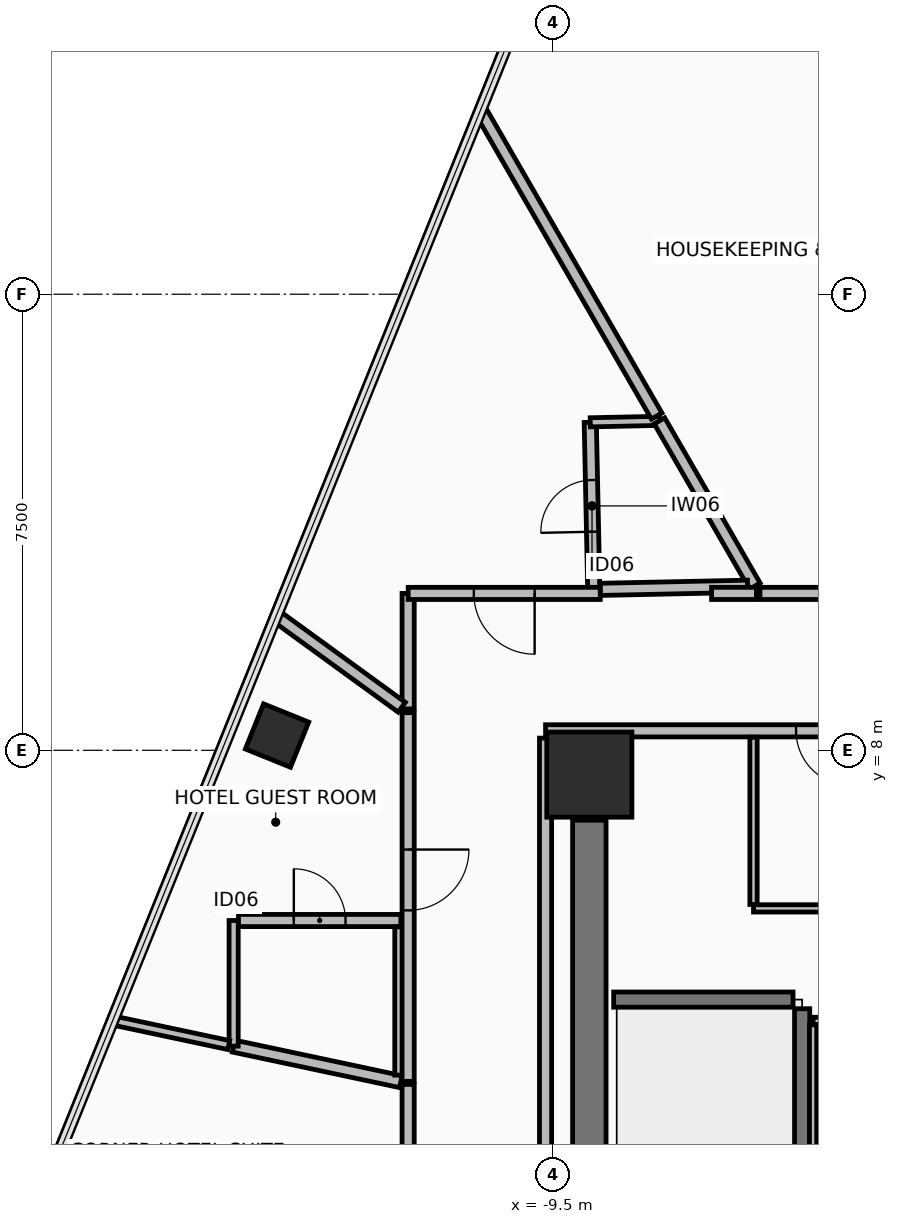
"""IFC4 building model, lengths in metres.
Left out: names, types, materials, properties, quantities, classifications, styles, units other than length and angle.
Written with IfcOpenShell. Run it as: python <this file> out.ifc"""

import sys

from ifc_helpers import new_model, si_unit, direction, frame, frame_2d, origin, origin_2d, place, context, subcontext, project, spatial, rectangle, hollow_rectangle, extrude, element, fill, save


model = new_model("IFC4")
c1 = context("Model", 3, precision=1e-05, world=origin(), true_north=direction((0.0, 1.0)))
c2 = subcontext(c1, "Body", "Model", "MODEL_VIEW")
j1 = project(units=[si_unit("LENGTHUNIT", "METRE"), si_unit("PLANEANGLEUNIT", "RADIAN")], contexts=[c1])
p1 = place(None, origin())
s1 = spatial("IfcSite", under=j1, at=p1, CompositionType="ELEMENT")
p2 = place(p1, origin())
s2 = spatial("IfcBuilding", under=s1, at=p2, CompositionType="ELEMENT")
p3 = place(p2, frame((0.0, 0.0, 63.85)))
s3 = spatial("IfcBuildingStorey", under=s2, at=p3, CompositionType="ELEMENT", Elevation=63.85)
p4 = place(p3, frame((-8.9, 7.6, 0.0), z_axis=(0.0, 0.0, 1.0), x_axis=(1.0, 0.0, 0.0)))
e1 = element("IfcColumn", 1, at=p4, inside=s3, PredefinedType="COLUMN", context=c2, shape_type="SweptSolid", body=[
    extrude(rectangle(XDim=1.4, YDim=1.4, at=origin_2d()), origin(), (0.0, 0.0, 1.0), 3.45),
])
p5 = place(p3, frame((-14.036, 8.242, 0.0), z_axis=(0.0, 0.0, 1.0), x_axis=(0.374608211656, 0.927183200754, 0.0)))
e2 = element("IfcColumn", 2, at=p5, inside=s3, PredefinedType="COLUMN", context=c2, shape_type="SweptSolid", body=[
    extrude(hollow_rectangle(XDim=0.8, YDim=0.8, WallThickness=0.045, at=origin_2d()), origin(), (0.0, 0.0, 1.0), 3.45),
])
p6 = place(p3, frame((-3.383, 19.273, 0.0), z_axis=(0.0, 0.0, 1.0), x_axis=(-0.615654149001, 0.788016477504, 0.0)))
e3 = element("IfcWall", 3, at=p6, inside=s3, PredefinedType="STANDARD", context=c2, shape_type="SweptSolid", body=[
    extrude(rectangle(XDim=7.5, YDim=0.3, at=frame_2d((3.75, 0.0))), origin(), (0.0, 0.0, 1.0), 2.47),
])
p7 = place(p6, frame((2.768, 0.0, 0.0)))
e4 = element("IfcOpeningElement", 4, at=p7, cuts=e3, PredefinedType="OPENING", context=c2, shape_type="SweptSolid", body=[
    extrude(rectangle(XDim=1.1, YDim=2.2, at=frame_2d((0.55, 1.1))), frame((0.0, 0.16, 0.0), z_axis=(0.0, -1.0, 0.0), x_axis=(1.0, 0.0, 0.0)), (0.0, 0.0, 1.0), 0.32),
])
p8 = place(p3, frame((-8.9, -3.85, 0.0), z_axis=(0.0, 0.0, 1.0), x_axis=(0.0, 1.0, 0.0)))
e5 = element("IfcWall", 5, at=p8, inside=s3, PredefinedType="SHEAR", context=c2, shape_type="SweptSolid", body=[
    extrude(rectangle(XDim=10.7, YDim=0.55, at=frame_2d((5.35, 0.0))), origin(), (0.0, 0.0, 1.0), 3.275),
])
p9 = place(p3, frame((9.62, 8.32, 0.0), z_axis=(0.0, 0.0, 1.0), x_axis=(-1.0, 0.0, 0.0)))
e6 = element("IfcWall", 6, at=p9, inside=s3, PredefinedType="PARTITIONING", context=c2, shape_type="SweptSolid", body=[
    extrude(rectangle(XDim=19.24, YDim=0.2, at=frame_2d((9.62, 0.0))), origin(), (0.0, 0.0, 1.0), 2.62),
])
p10 = place(p9, frame((14.22, 0.0, 0.0)))
e7 = element("IfcOpeningElement", 7, at=p10, cuts=e6, PredefinedType="OPENING", context=c2, shape_type="SweptSolid", body=[
    extrude(rectangle(XDim=0.9, YDim=2.1, at=frame_2d((0.45, 1.05))), frame((0.0, 0.11, 0.0), z_axis=(0.0, -1.0, 0.0), x_axis=(1.0, 0.0, 0.0)), (0.0, 0.0, 1.0), 0.22),
])
p11 = place(p3, frame((-9.62, 8.2, 0.0), z_axis=(0.0, 0.0, 1.0), x_axis=(0.0, -1.0, 0.0)))
e8 = element("IfcWall", 8, at=p11, inside=s3, PredefinedType="PARTITIONING", context=c2, shape_type="SweptSolid", body=[
    extrude(rectangle(XDim=16.4, YDim=0.2, at=frame_2d((8.2, 0.0))), origin(), (0.0, 0.0, 1.0), 2.67),
])
p12 = place(p11, frame((12.65, 0.0, 0.0)))
e9 = element("IfcOpeningElement", 9, at=p12, cuts=e8, PredefinedType="OPENING", context=c2, shape_type="SweptSolid", body=[
    extrude(rectangle(XDim=1.1, YDim=2.15, at=frame_2d((0.55, 1.075))), frame((0.0, 0.11, 0.0), z_axis=(0.0, -1.0, 0.0), x_axis=(1.0, 0.0, 0.0)), (0.0, 0.0, 1.0), 0.22),
])
p13 = place(p3, frame((-5.4, -3.55, 0.0), z_axis=(0.0, 0.0, 1.0), x_axis=(0.0, 1.0, 0.0)))
e10 = element("IfcWall", 10, at=p13, inside=s3, PredefinedType="SHEAR", context=c2, shape_type="SweptSolid", body=[
    extrude(rectangle(XDim=7.3, YDim=0.25, at=frame_2d((3.65, 0.0))), origin(), (0.0, 0.0, 1.0), 3.275),
])
p14 = place(p3, frame((-8.5, 3.9, 0.0), z_axis=(0.0, 0.0, 1.0), x_axis=(1.0, 0.0, 0.0)))
e11 = element("IfcWall", 11, at=p14, inside=s3, PredefinedType="SHEAR", context=c2, shape_type="SweptSolid", body=[
    extrude(rectangle(XDim=2.95, YDim=0.25, at=frame_2d((1.475, 0.0))), origin(), (0.0, 0.0, 1.0), 3.275),
])
p15 = place(p3, frame((-2.115, 3.55, 0.0), z_axis=(0.0, 0.0, 1.0), x_axis=(-1.0, 0.0, 0.0)))
e12 = element("IfcWall", 12, at=p15, inside=s3, PredefinedType="PARTITIONING", context=c2, shape_type="SweptSolid", body=[
    extrude(rectangle(XDim=3.105, YDim=0.12, at=frame_2d((1.552, 0.0))), origin(), (0.0, 0.0, 1.0), 3.275),
])
p16 = place(p3, frame((-5.22, 3.485, 0.0), z_axis=(0.0, 0.0, 1.0), x_axis=(0.0, -1.0, 0.0)))
e13 = element("IfcWall", 13, at=p16, inside=s3, PredefinedType="PARTITIONING", context=c2, shape_type="SweptSolid", body=[
    extrude(rectangle(XDim=2.97, YDim=0.12, at=frame_2d((1.485, 0.0))), origin(), (0.0, 0.0, 1.0), 3.275),
])
p17 = place(p3, frame((-6.2, 5.4, 0.0), z_axis=(0.0, 0.0, 1.0), x_axis=(1.0, 0.0, 0.0)))
e14 = element("IfcWall", 14, at=p17, inside=s3, PredefinedType="PARTITIONING", context=c2, shape_type="SweptSolid", body=[
    extrude(rectangle(XDim=2.3, YDim=0.12, at=frame_2d((1.15, 0.0))), origin(), (0.0, 0.0, 1.0), 3.275),
])
p18 = place(p3, frame((-6.2, 8.215, 0.0), z_axis=(0.0, 0.0, 1.0), x_axis=(0.0, -1.0, 0.0)))
e15 = element("IfcWall", 15, at=p18, inside=s3, PredefinedType="PARTITIONING", context=c2, shape_type="SweptSolid", body=[
    extrude(rectangle(XDim=2.75, YDim=0.12, at=frame_2d((1.375, 0.0))), origin(), (0.0, 0.0, 1.0), 2.47),
])
p19 = place(p3, frame((-8.827, 10.644, 0.0), z_axis=(0.0, 0.0, 1.0), x_axis=(-0.021041428763, 0.99977860463, 0.0)))
e16 = element("IfcWall", 16, at=p19, inside=s3, PredefinedType="PARTITIONING", context=c2, shape_type="SweptSolid", body=[
    extrude(rectangle(XDim=2.75, YDim=0.2, at=frame_2d((1.375, 0.0))), origin(), (0.0, 0.0, 1.0), 2.67),
])
p20 = place(p19, frame((0.95, 0.0, 0.0)))
e17 = element("IfcOpeningElement", 17, at=p20, cuts=e16, PredefinedType="OPENING", context=c2, shape_type="SweptSolid", body=[
    extrude(rectangle(XDim=0.85, YDim=2.1, at=frame_2d((0.425, 1.05))), frame((0.0, 0.11, 0.0), z_axis=(0.0, -1.0, 0.0), x_axis=(1.0, 0.0, 0.0)), (0.0, 0.0, 1.0), 0.22),
])
p21 = place(p3, frame((-8.885, 13.394, 0.0), z_axis=(0.0, 0.0, 1.0), x_axis=(0.999779226224, 0.02101187308, 0.0)))
e18 = element("IfcWall", 18, at=p21, inside=s3, PredefinedType="PARTITIONING", context=c2, shape_type="SweptSolid", body=[
    extrude(rectangle(XDim=1.139, YDim=0.15, at=frame_2d((0.569, 0.0))), origin(), (0.0, 0.0, 1.0), 2.67),
])
p22 = place(p3, frame((-7.747, 13.417, 0.0), z_axis=(0.0, 0.0, 1.0), x_axis=(0.50003000113, -0.866008081931, 0.0)))
e19 = element("IfcWall", 19, at=p22, inside=s3, PredefinedType="PARTITIONING", context=c2, shape_type="SweptSolid", body=[
    extrude(rectangle(XDim=3.138, YDim=0.2, at=frame_2d((1.569, 0.0))), origin(), (0.0, 0.0, 1.0), 2.62),
])
p23 = place(p3, frame((-6.297, 10.698, 0.0), z_axis=(0.0, 0.0, 1.0), x_axis=(-0.999778667622, -0.021038435515, 0.0)))
e20 = element("IfcWall", 20, at=p23, inside=s3, PredefinedType="PARTITIONING", context=c2, shape_type="SweptSolid", body=[
    extrude(rectangle(XDim=2.425, YDim=0.2, at=frame_2d((1.213, 0.0))), origin(), (0.0, 0.0, 1.0), 2.62),
])
p24 = place(p3, frame((-12.0, 2.551, 0.0), z_axis=(0.0, 0.0, 1.0), x_axis=(-0.978151787969, 0.207891990447, 0.0)))
e21 = element("IfcWall", 21, at=p24, inside=s3, PredefinedType="PARTITIONING", context=c2, shape_type="SweptSolid", body=[
    extrude(rectangle(XDim=2.812, YDim=0.2, at=frame_2d((1.406, 0.0))), origin(), (0.0, 0.0, 1.0), 2.87),
])
p25 = place(p3, frame((-14.75, 3.135, 0.0), z_axis=(0.0, 0.0, 1.0), x_axis=(0.0, 1.0, 0.0)))
e22 = element("IfcWall", 22, at=p25, inside=s3, PredefinedType="PARTITIONING", context=c2, shape_type="SweptSolid", body=[
    extrude(rectangle(XDim=2.065, YDim=0.15, at=frame_2d((1.033, 0.0))), origin(), (0.0, 0.0, 1.0), 3.275),
])
p26 = place(p3, frame((-14.67, 5.201, 0.0), z_axis=(0.0, 0.0, 1.0), x_axis=(1.0, 0.0, 0.0)))
e23 = element("IfcWall", 23, at=p26, inside=s3, PredefinedType="PARTITIONING", context=c2, shape_type="SweptSolid", body=[
    extrude(rectangle(XDim=2.67, YDim=0.2, at=frame_2d((1.335, 0.0))), origin(), (0.0, 0.0, 1.0), 2.87),
])
p27 = place(p26, frame((0.91, 0.0, 0.0)))
e24 = element("IfcOpeningElement", 24, at=p27, cuts=e23, PredefinedType="OPENING", context=c2, shape_type="SweptSolid", body=[
    extrude(rectangle(XDim=0.85, YDim=2.1, at=frame_2d((0.425, 1.05))), frame((0.0, 0.11, 0.0), z_axis=(0.0, -1.0, 0.0), x_axis=(1.0, 0.0, 0.0)), (0.0, 0.0, 1.0), 0.22),
])
p28 = place(p3, frame((-12.0, 5.096, 0.0), z_axis=(0.0, 0.0, 1.0), x_axis=(0.0, -1.0, 0.0)))
e25 = element("IfcWall", 25, at=p28, inside=s3, PredefinedType="PARTITIONING", context=c2, shape_type="SweptSolid", body=[
    extrude(rectangle(XDim=2.438, YDim=0.2, at=frame_2d((1.219, 0.0))), origin(), (0.0, 0.0, 1.0), 3.275),
])
p29 = place(p3, frame((-1.14, 10.58, 0.0), z_axis=(0.0, 0.0, 1.0), x_axis=(-1.0, 0.0, 0.0)))
e26 = element("IfcWall", 26, at=p29, inside=s3, PredefinedType="PARTITIONING", context=c2, shape_type="SweptSolid", body=[
    extrude(rectangle(XDim=4.954, YDim=0.2, at=frame_2d((2.477, 0.0))), origin(), (0.0, 0.0, 1.0), 3.275),
])
p30 = place(p29, frame((2.027, 0.0, 0.0)))
e27 = element("IfcOpeningElement", 27, at=p30, cuts=e26, PredefinedType="OPENING", context=c2, shape_type="SweptSolid", body=[
    extrude(rectangle(XDim=0.9, YDim=2.1, at=frame_2d((0.45, 1.05))), frame((0.0, 0.11, 0.0), z_axis=(0.0, -1.0, 0.0), x_axis=(1.0, 0.0, 0.0)), (0.0, 0.0, 1.0), 0.22),
])
p31 = place(p3, frame((-7.792, 13.497, 0.0), z_axis=(0.0, 0.0, 1.0), x_axis=(-0.499990180648, 0.866031072916, 0.0)))
e28 = element("IfcWall", 28, at=p31, inside=s3, PredefinedType="PARTITIONING", context=c2, shape_type="SweptSolid", body=[
    extrude(rectangle(XDim=5.789, YDim=0.2, at=frame_2d((2.894, 0.0))), origin(), (0.0, 0.0, 1.0), 2.47),
])
p32 = place(p3, frame((-11.88, 10.579, 0.0), z_axis=(0.0, 0.0, 1.0), x_axis=(0.0, -1.0, 0.0)))
e29 = element("IfcWall", 29, at=p32, inside=s3, PredefinedType="PARTITIONING", context=c2, shape_type="SweptSolid", body=[
    extrude(rectangle(XDim=1.899, YDim=0.2, at=frame_2d((0.949, 0.0))), origin(), (0.0, 0.0, 1.0), 3.275),
])
p33 = place(p3, frame((-11.985, 8.708, 0.0), z_axis=(0.0, 0.0, 1.0), x_axis=(-0.808973513656, 0.587845093713, 0.0)))
e30 = element("IfcWall", 30, at=p33, inside=s3, PredefinedType="PARTITIONING", context=c2, shape_type="SweptSolid", body=[
    extrude(rectangle(XDim=2.534, YDim=0.2, at=frame_2d((1.267, 0.0))), origin(), (0.0, 0.0, 1.0), 2.47),
])
p34 = place(p3, frame((-6.152, 10.58, 0.0), z_axis=(0.0, 0.0, 1.0), x_axis=(-1.0, 0.0, 0.0)))
e31 = element("IfcWall", 31, at=p34, inside=s3, PredefinedType="PARTITIONING", context=c2, shape_type="SweptSolid", body=[
    extrude(rectangle(XDim=0.738, YDim=0.2, at=frame_2d((0.369, 0.0))), origin(), (0.0, 0.0, 1.0), 3.275),
])
p35 = place(p3, frame((-8.721, 10.58, 0.0), z_axis=(0.0, 0.0, 1.0), x_axis=(-1.0, 0.0, 0.0)))
e32 = element("IfcWall", 32, at=p35, inside=s3, PredefinedType="PARTITIONING", context=c2, shape_type="SweptSolid", body=[
    extrude(rectangle(XDim=3.159, YDim=0.2, at=frame_2d((1.579, 0.0))), origin(), (0.0, 0.0, 1.0), 2.67),
])
p36 = place(p35, frame((1.079, 0.0, 0.0)))
e33 = element("IfcOpeningElement", 33, at=p36, cuts=e32, PredefinedType="OPENING", context=c2, shape_type="SweptSolid", body=[
    extrude(rectangle(XDim=1.0, YDim=2.15, at=frame_2d((0.5, 1.075))), frame((0.0, 0.11, 0.0), z_axis=(0.0, -1.0, 0.0), x_axis=(1.0, 0.0, 0.0)), (0.0, 0.0, 1.0), 0.22),
])
p37 = place(p3, frame((-11.88, 8.619, 0.0), z_axis=(0.0, 0.0, 1.0), x_axis=(0.0, -1.0, 0.0)))
e34 = element("IfcWall", 34, at=p37, inside=s3, PredefinedType="PARTITIONING", context=c2, shape_type="SweptSolid", body=[
    extrude(rectangle(XDim=6.063, YDim=0.2, at=frame_2d((3.031, 0.0))), origin(), (0.0, 0.0, 1.0), 2.67),
])
p38 = place(p37, frame((2.251, 0.0, 0.0)))
e35 = element("IfcOpeningElement", 35, at=p38, cuts=e34, PredefinedType="OPENING", context=c2, shape_type="SweptSolid", body=[
    extrude(rectangle(XDim=1.0, YDim=2.15, at=frame_2d((0.5, 1.075))), frame((0.0, 0.11, 0.0), z_axis=(0.0, -1.0, 0.0), x_axis=(1.0, 0.0, 0.0)), (0.0, 0.0, 1.0), 0.22),
])
p39 = place(p3, frame((-14.83, 3.152, 0.0), z_axis=(0.0, 0.0, 1.0), x_axis=(-0.978137847221, 0.207957572197, 0.0)))
e36 = element("IfcWall", 36, at=p39, inside=s3, PredefinedType="PARTITIONING", context=c2, shape_type="SweptSolid", body=[
    extrude(rectangle(XDim=1.921, YDim=0.15, at=frame_2d((0.96, 0.0))), origin(), (0.0, 0.0, 1.0), 2.47),
])
p40 = place(p3, frame((-11.88, 2.505, 0.0), z_axis=(0.0, 0.0, 1.0), x_axis=(0.0, -1.0, 0.0)))
e37 = element("IfcWall", 37, at=p40, inside=s3, PredefinedType="PARTITIONING", context=c2, shape_type="SweptSolid", body=[
    extrude(rectangle(XDim=5.01, YDim=0.2, at=frame_2d((2.505, 0.0))), origin(), (0.0, 0.0, 1.0), 3.275),
])
p41 = place(p40, frame((1.725, 0.0, 0.0)))
e38 = element("IfcOpeningElement", 38, at=p41, cuts=e37, PredefinedType="OPENING", context=c2, shape_type="SweptSolid", body=[
    extrude(rectangle(XDim=1.0, YDim=2.15, at=frame_2d((0.5, 1.075))), frame((0.0, 0.11, 0.0), z_axis=(0.0, -1.0, 0.0), x_axis=(1.0, 0.0, 0.0)), (0.0, 0.0, 1.0), 0.22),
])
p42 = place(p10, origin())
e39 = element("IfcDoor", 39, at=p42, inside=s3, OperationType="SINGLE_SWING_LEFT", PredefinedType="DOOR", context=c2, shape_type="SweptSolid", body=[
    extrude(rectangle(XDim=0.9, YDim=2.1, at=frame_2d((0.45, 1.05))), frame((0.0, 0.025, 0.0), z_axis=(0.0, -1.0, 0.0), x_axis=(1.0, 0.0, 0.0)), (0.0, 0.0, 1.0), 0.05),
])
fill(e7, e39)
p43 = place(p20, origin())
e40 = element("IfcDoor", 40, at=p43, inside=s3, OperationType="SINGLE_SWING_RIGHT", PredefinedType="DOOR", context=c2, shape_type="SweptSolid", body=[
    extrude(rectangle(XDim=0.85, YDim=2.1, at=frame_2d((0.425, 1.05))), frame((0.0, 0.025, 0.0), z_axis=(0.0, -1.0, 0.0), x_axis=(1.0, 0.0, 0.0)), (0.0, 0.0, 1.0), 0.05),
])
fill(e17, e40)
p44 = place(p27, origin())
e41 = element("IfcDoor", 41, at=p44, inside=s3, OperationType="SINGLE_SWING_RIGHT", PredefinedType="DOOR", context=c2, shape_type="SweptSolid", body=[
    extrude(rectangle(XDim=0.85, YDim=2.1, at=frame_2d((0.425, 1.05))), frame((0.0, 0.025, 0.0), z_axis=(0.0, -1.0, 0.0), x_axis=(1.0, 0.0, 0.0)), (0.0, 0.0, 1.0), 0.05),
])
fill(e24, e41)
p45 = place(p36, origin())
e42 = element("IfcDoor", 42, at=p45, inside=s3, OperationType="SINGLE_SWING_LEFT", PredefinedType="DOOR", context=c2, shape_type="SweptSolid", body=[
    extrude(rectangle(XDim=1.0, YDim=2.15, at=frame_2d((0.5, 1.075))), frame((0.0, 0.025, 0.0), z_axis=(0.0, -1.0, 0.0), x_axis=(1.0, 0.0, 0.0)), (0.0, 0.0, 1.0), 0.05),
])
fill(e33, e42)
p46 = place(p38, origin())
e43 = element("IfcDoor", 43, at=p46, inside=s3, OperationType="SINGLE_SWING_LEFT", PredefinedType="DOOR", context=c2, shape_type="SweptSolid", body=[
    extrude(rectangle(XDim=1.0, YDim=2.15, at=frame_2d((0.5, 1.075))), frame((0.0, 0.025, 0.0), z_axis=(0.0, -1.0, 0.0), x_axis=(1.0, 0.0, 0.0)), (0.0, 0.0, 1.0), 0.05),
])
fill(e35, e43)
save(model, sys.argv[1])
